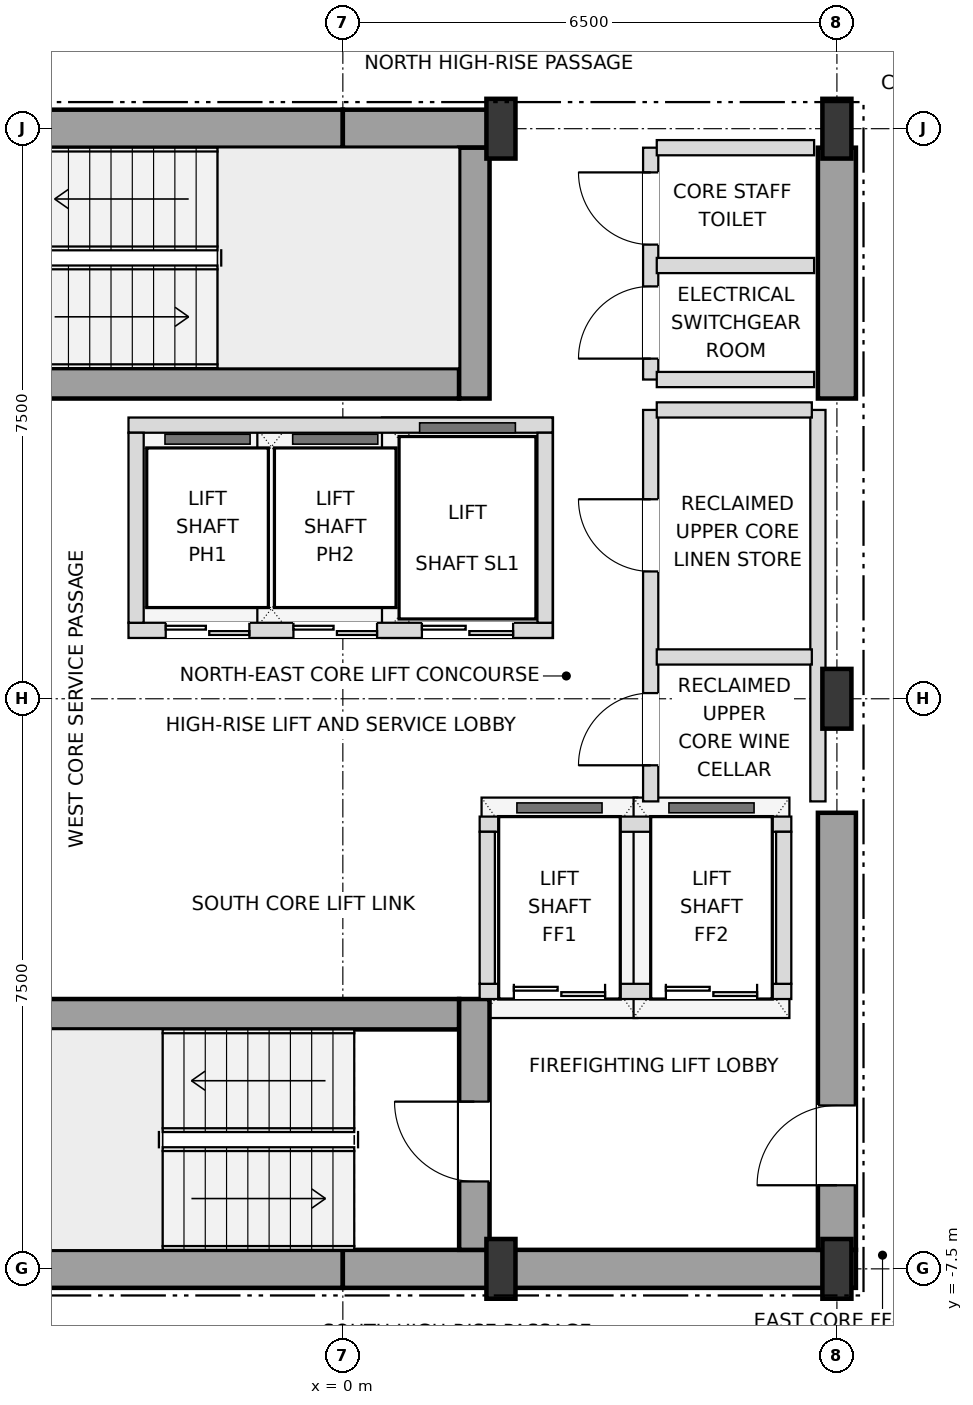
"""IFC4 building model, lengths in metres.
Left out: names, types, materials, properties, quantities, classifications, styles, units other than length and angle.
Written with IfcOpenShell. Run it as: python <this file> out.ifc"""

import sys

from ifc_helpers import new_model, si_unit, direction, frame, frame_2d, origin, origin_2d, place, context, subcontext, project, spatial, rectangle, i_section, extrude, element, fill, save


model = new_model("IFC4")
c1 = context("Model", 3, precision=1e-05, world=origin(), true_north=direction((0.0, 1.0)))
c2 = subcontext(c1, "Body", "Model", "MODEL_VIEW")
j1 = project(units=[si_unit("LENGTHUNIT", "METRE"), si_unit("PLANEANGLEUNIT", "RADIAN")], contexts=[c1])
p1 = place(None, origin())
s1 = spatial("IfcSite", under=j1, at=p1, CompositionType="ELEMENT")
p2 = place(p1, origin())
s2 = spatial("IfcBuilding", under=s1, at=p2, CompositionType="ELEMENT")
p3 = place(p2, frame((0.0, 0.0, 283.5)))
s3 = spatial("IfcBuildingStorey", under=s2, at=p3, CompositionType="ELEMENT", Elevation=283.5)
for number, where, z_axis, x_axis in (
    (1, (2.08, -7.5, 0.0), (0.0, 0.0, 1.0), (1.0, 0.0, 0.0)),
    (2, (6.5, -7.5, 0.0), (0.0, 0.0, 1.0), (1.0, 0.0, 0.0)),
    (3, (6.5, 0.0, 0.0), (0.0, 0.0, 1.0), (1.0, 0.0, 0.0)),
    (4, (2.08, 7.5, 0.0), (0.0, 0.0, 1.0), (1.0, 0.0, 0.0)),
    (5, (6.5, 7.5, 0.0), (0.0, 0.0, 1.0), (1.0, 0.0, 0.0)),
):
    element("IfcColumn", number, at=place(p3, frame(where, z_axis=z_axis, x_axis=x_axis)), inside=s3, PredefinedType="COLUMN", context=c2, shape_type="SweptSolid", body=[
        extrude(i_section(OverallWidth=0.382, OverallDepth=0.786, WebThickness=0.02, FlangeThickness=0.033, at=origin_2d()), origin(), (0.0, 0.0, 1.0), 3.6),
    ])
for number, where, z_axis, x_axis in (
    (6, (-6.75, -7.5, 0.0), (0.0, 0.0, 1.0), (1.0, 0.0, 0.0)),
    (7, (0.0, -7.5, 0.0), (0.0, 0.0, 1.0), (1.0, 0.0, 0.0)),
):
    element("IfcWall", number, at=place(p3, frame(where, z_axis=z_axis, x_axis=x_axis)), inside=s3, PredefinedType="SHEAR", context=c2, shape_type="SweptSolid", body=[
        extrude(rectangle(XDim=6.75, YDim=0.5, at=frame_2d((3.375, 0.0))), origin(), (0.0, 0.0, 1.0), 3.38),
    ])
p4 = place(p3, frame((-6.75, 7.5, 0.0), z_axis=(0.0, 0.0, 1.0), x_axis=(1.0, 0.0, 0.0)))
e8 = element("IfcWall", 8, at=p4, inside=s3, PredefinedType="SHEAR", context=c2, shape_type="SweptSolid", body=[
    extrude(rectangle(XDim=6.75, YDim=0.5, at=frame_2d((3.375, 0.0))), origin(), (0.0, 0.0, 1.0), 3.38),
])
p5 = place(p4, frame((1.65, 0.0, 0.0)))
e9 = element("IfcOpeningElement", 9, at=p5, cuts=e8, PredefinedType="OPENING", context=c2, shape_type="SweptSolid", body=[
    extrude(rectangle(XDim=1.05, YDim=2.15, at=frame_2d((0.525, 1.075))), frame((0.0, 0.26, 0.0), z_axis=(0.0, -1.0, 0.0), x_axis=(1.0, 0.0, 0.0)), (0.0, 0.0, 1.0), 0.52),
])
p6 = place(p3, frame((0.0, 7.5, 0.0), z_axis=(0.0, 0.0, 1.0), x_axis=(1.0, 0.0, 0.0)))
e10 = element("IfcWall", 10, at=p6, inside=s3, PredefinedType="SHEAR", context=c2, shape_type="SweptSolid", body=[
    extrude(rectangle(XDim=2.08, YDim=0.5, at=frame_2d((1.04, 0.0))), origin(), (0.0, 0.0, 1.0), 3.38),
])
p7 = place(p3, frame((6.5, -7.25, 0.0), z_axis=(0.0, 0.0, 1.0), x_axis=(0.0, 1.0, 0.0)))
e11 = element("IfcWall", 11, at=p7, inside=s3, PredefinedType="SHEAR", context=c2, shape_type="SweptSolid", body=[
    extrude(rectangle(XDim=5.75, YDim=0.5, at=frame_2d((2.875, 0.0))), origin(), (0.0, 0.0, 1.0), 3.38),
])
p8 = place(p7, frame((0.85, 0.0, 0.0)))
e12 = element("IfcOpeningElement", 12, at=p8, cuts=e11, PredefinedType="OPENING", context=c2, shape_type="SweptSolid", body=[
    extrude(rectangle(XDim=1.05, YDim=2.15, at=frame_2d((0.525, 1.075))), frame((0.0, 0.26, 0.0), z_axis=(0.0, -1.0, 0.0), x_axis=(1.0, 0.0, 0.0)), (0.0, 0.0, 1.0), 0.52),
])
p9 = place(p3, frame((6.5, 3.95, 0.0), z_axis=(0.0, 0.0, 1.0), x_axis=(0.0, 1.0, 0.0)))
e13 = element("IfcWall", 13, at=p9, inside=s3, PredefinedType="SHEAR", context=c2, shape_type="SweptSolid", body=[
    extrude(rectangle(XDim=3.3, YDim=0.5, at=frame_2d((1.65, 0.0))), origin(), (0.0, 0.0, 1.0), 3.38),
])
p10 = place(p3, frame((-6.25, -4.15, 0.0), z_axis=(0.0, 0.0, 1.0), x_axis=(1.0, 0.0, 0.0)))
e14 = element("IfcWall", 14, at=p10, inside=s3, PredefinedType="SHEAR", context=c2, shape_type="SweptSolid", body=[
    extrude(rectangle(XDim=7.78, YDim=0.4, at=frame_2d((3.89, 0.0))), origin(), (0.0, 0.0, 1.0), 3.38),
])
p11 = place(p3, frame((1.73, -7.25, 0.0), z_axis=(0.0, 0.0, 1.0), x_axis=(0.0, 1.0, 0.0)))
e15 = element("IfcWall", 15, at=p11, inside=s3, PredefinedType="SHEAR", context=c2, shape_type="SweptSolid", body=[
    extrude(rectangle(XDim=3.3, YDim=0.4, at=frame_2d((1.65, 0.0))), origin(), (0.0, 0.0, 1.0), 3.38),
])
p12 = place(p11, frame((0.9, 0.0, 0.0)))
e16 = element("IfcOpeningElement", 16, at=p12, cuts=e15, PredefinedType="OPENING", context=c2, shape_type="SweptSolid", body=[
    extrude(rectangle(XDim=1.05, YDim=2.15, at=frame_2d((0.525, 1.075))), frame((0.0, 0.21, 0.0), z_axis=(0.0, -1.0, 0.0), x_axis=(1.0, 0.0, 0.0)), (0.0, 0.0, 1.0), 0.42),
])
p13 = place(p3, frame((-5.55, 4.15, 0.0), z_axis=(0.0, 0.0, 1.0), x_axis=(1.0, 0.0, 0.0)))
e17 = element("IfcWall", 17, at=p13, inside=s3, PredefinedType="SHEAR", context=c2, shape_type="SweptSolid", body=[
    extrude(rectangle(XDim=7.08, YDim=0.4, at=frame_2d((3.54, 0.0))), origin(), (0.0, 0.0, 1.0), 3.38),
])
p14 = place(p3, frame((1.73, 3.95, 0.0), z_axis=(0.0, 0.0, 1.0), x_axis=(0.0, 1.0, 0.0)))
e18 = element("IfcWall", 18, at=p14, inside=s3, PredefinedType="SHEAR", context=c2, shape_type="SweptSolid", body=[
    extrude(rectangle(XDim=3.3, YDim=0.4, at=frame_2d((1.65, 0.0))), origin(), (0.0, 0.0, 1.0), 3.38),
])
p15 = place(p3, frame((-2.82, 0.9, 0.0), z_axis=(0.0, 0.0, 1.0), x_axis=(1.0, 0.0, 0.0)))
e19 = element("IfcWall", 19, at=p15, inside=s3, PredefinedType="SOLIDWALL", context=c2, shape_type="SweptSolid", body=[
    extrude(rectangle(XDim=5.58, YDim=0.2, at=frame_2d((2.79, 0.0))), origin(), (0.0, 0.0, 1.0), 3.38),
])
p16 = place(p15, frame((0.49, 0.0, 0.0)))
e20 = element("IfcOpeningElement", 20, at=p16, cuts=e19, PredefinedType="OPENING", context=c2, shape_type="SweptSolid", body=[
    extrude(rectangle(XDim=1.1, YDim=2.15, at=frame_2d((0.55, 1.075))), frame((0.0, 0.11, 0.0), z_axis=(0.0, -1.0, 0.0), x_axis=(1.0, 0.0, 0.0)), (0.0, 0.0, 1.0), 0.22),
])
p17 = place(p15, frame((2.17, 0.0, 0.0)))
e21 = element("IfcOpeningElement", 21, at=p17, cuts=e19, PredefinedType="OPENING", context=c2, shape_type="SweptSolid", body=[
    extrude(rectangle(XDim=1.1, YDim=2.15, at=frame_2d((0.55, 1.075))), frame((0.0, 0.11, 0.0), z_axis=(0.0, -1.0, 0.0), x_axis=(1.0, 0.0, 0.0)), (0.0, 0.0, 1.0), 0.22),
])
p18 = place(p15, frame((3.86, 0.0, 0.0)))
e22 = element("IfcOpeningElement", 22, at=p18, cuts=e19, PredefinedType="OPENING", context=c2, shape_type="SweptSolid", body=[
    extrude(rectangle(XDim=1.2, YDim=2.2, at=frame_2d((0.6, 1.1))), frame((0.0, 0.11, 0.0), z_axis=(0.0, -1.0, 0.0), x_axis=(1.0, 0.0, 0.0)), (0.0, 0.0, 1.0), 0.22),
])
p19 = place(p3, frame((-2.82, 3.6, 0.0), z_axis=(0.0, 0.0, 1.0), x_axis=(1.0, 0.0, 0.0)))
e23 = element("IfcWall", 23, at=p19, inside=s3, PredefinedType="SOLIDWALL", context=c2, shape_type="SweptSolid", body=[
    extrude(rectangle(XDim=5.58, YDim=0.2, at=frame_2d((2.79, 0.0))), origin(), (0.0, 0.0, 1.0), 3.38),
])
for number, where, z_axis, x_axis in (
    (24, (-2.72, 1.0, 0.0), (0.0, 0.0, 1.0), (0.0, 1.0, 0.0)),
    (25, (2.66, 1.0, 0.0), (0.0, 0.0, 1.0), (0.0, 1.0, 0.0)),
):
    element("IfcWall", number, at=place(p3, frame(where, z_axis=z_axis, x_axis=x_axis)), inside=s3, PredefinedType="SOLIDWALL", context=c2, shape_type="SweptSolid", body=[
        extrude(rectangle(XDim=2.5, YDim=0.2, at=frame_2d((1.25, 0.0))), origin(), (0.0, 0.0, 1.0), 3.38),
    ])
p20 = place(p3, frame((1.8, -3.85, 0.0), z_axis=(0.0, 0.0, 1.0), x_axis=(1.0, 0.0, 0.0)))
e26 = element("IfcWall", 26, at=p20, inside=s3, PredefinedType="SOLIDWALL", context=c2, shape_type="SweptSolid", body=[
    extrude(rectangle(XDim=4.1, YDim=0.2, at=frame_2d((2.05, 0.0))), origin(), (0.0, 0.0, 1.0), 3.38),
])
p21 = place(p20, frame((0.45, 0.0, 0.0)))
e27 = element("IfcOpeningElement", 27, at=p21, cuts=e26, PredefinedType="OPENING", context=c2, shape_type="SweptSolid", body=[
    extrude(rectangle(XDim=1.2, YDim=2.2, at=frame_2d((0.6, 1.1))), frame((0.0, 0.11, 0.0), z_axis=(0.0, -1.0, 0.0), x_axis=(1.0, 0.0, 0.0)), (0.0, 0.0, 1.0), 0.22),
])
p22 = place(p20, frame((2.45, 0.0, 0.0)))
e28 = element("IfcOpeningElement", 28, at=p22, cuts=e26, PredefinedType="OPENING", context=c2, shape_type="SweptSolid", body=[
    extrude(rectangle(XDim=1.2, YDim=2.2, at=frame_2d((0.6, 1.1))), frame((0.0, 0.11, 0.0), z_axis=(0.0, -1.0, 0.0), x_axis=(1.0, 0.0, 0.0)), (0.0, 0.0, 1.0), 0.22),
])
p23 = place(p3, frame((1.8, -1.65, 0.0), z_axis=(0.0, 0.0, 1.0), x_axis=(1.0, 0.0, 0.0)))
e29 = element("IfcWall", 29, at=p23, inside=s3, PredefinedType="SOLIDWALL", context=c2, shape_type="SweptSolid", body=[
    extrude(rectangle(XDim=4.1, YDim=0.2, at=frame_2d((2.05, 0.0))), origin(), (0.0, 0.0, 1.0), 3.38),
])
for number, where, z_axis, x_axis in (
    (30, (1.9, -3.75, 0.0), (0.0, 0.0, 1.0), (0.0, 1.0, 0.0)),
    (31, (5.8, -3.75, 0.0), (0.0, 0.0, 1.0), (0.0, 1.0, 0.0)),
):
    element("IfcWall", number, at=place(p3, frame(where, z_axis=z_axis, x_axis=x_axis)), inside=s3, PredefinedType="SOLIDWALL", context=c2, shape_type="SweptSolid", body=[
        extrude(rectangle(XDim=2.0, YDim=0.2, at=frame_2d((1.0, 0.0))), origin(), (0.0, 0.0, 1.0), 3.38),
    ])
p24 = place(p3, frame((4.05, -1.35, 0.0), z_axis=(0.0, 0.0, 1.0), x_axis=(0.0, 1.0, 0.0)))
e32 = element("IfcWall", 32, at=p24, inside=s3, PredefinedType="SOLIDWALL", context=c2, shape_type="SweptSolid", body=[
    extrude(rectangle(XDim=5.15, YDim=0.2, at=frame_2d((2.575, 0.0))), origin(), (0.0, 0.0, 1.0), 3.38),
])
p25 = place(p24, frame((0.475, 0.0, 0.0)))
e33 = element("IfcOpeningElement", 33, at=p25, cuts=e32, PredefinedType="OPENING", context=c2, shape_type="SweptSolid", body=[
    extrude(rectangle(XDim=0.95, YDim=2.15, at=frame_2d((0.475, 1.075))), frame((0.0, 0.11, 0.0), z_axis=(0.0, -1.0, 0.0), x_axis=(1.0, 0.0, 0.0)), (0.0, 0.0, 1.0), 0.22),
])
p26 = place(p24, frame((3.025, 0.0, 0.0)))
e34 = element("IfcOpeningElement", 34, at=p26, cuts=e32, PredefinedType="OPENING", context=c2, shape_type="SweptSolid", body=[
    extrude(rectangle(XDim=0.95, YDim=2.15, at=frame_2d((0.475, 1.075))), frame((0.0, 0.11, 0.0), z_axis=(0.0, -1.0, 0.0), x_axis=(1.0, 0.0, 0.0)), (0.0, 0.0, 1.0), 0.22),
])
p27 = place(p3, frame((4.05, 4.2, 0.0), z_axis=(0.0, 0.0, 1.0), x_axis=(0.0, 1.0, 0.0)))
e35 = element("IfcWall", 35, at=p27, inside=s3, PredefinedType="SOLIDWALL", context=c2, shape_type="SweptSolid", body=[
    extrude(rectangle(XDim=3.05, YDim=0.2, at=frame_2d((1.525, 0.0))), origin(), (0.0, 0.0, 1.0), 3.38),
])
p28 = place(p27, frame((0.275, 0.0, 0.0)))
e36 = element("IfcOpeningElement", 36, at=p28, cuts=e35, PredefinedType="OPENING", context=c2, shape_type="SweptSolid", body=[
    extrude(rectangle(XDim=0.95, YDim=2.15, at=frame_2d((0.475, 1.075))), frame((0.0, 0.11, 0.0), z_axis=(0.0, -1.0, 0.0), x_axis=(1.0, 0.0, 0.0)), (0.0, 0.0, 1.0), 0.22),
])
p29 = place(p27, frame((1.775, 0.0, 0.0)))
e37 = element("IfcOpeningElement", 37, at=p29, cuts=e35, PredefinedType="OPENING", context=c2, shape_type="SweptSolid", body=[
    extrude(rectangle(XDim=0.95, YDim=2.15, at=frame_2d((0.475, 1.075))), frame((0.0, 0.11, 0.0), z_axis=(0.0, -1.0, 0.0), x_axis=(1.0, 0.0, 0.0)), (0.0, 0.0, 1.0), 0.22),
])
p30 = place(p3, frame((6.25, -1.35, 0.0), z_axis=(0.0, 0.0, 1.0), x_axis=(0.0, 1.0, 0.0)))
e38 = element("IfcWall", 38, at=p30, inside=s3, PredefinedType="SOLIDWALL", context=c2, shape_type="SweptSolid", body=[
    extrude(rectangle(XDim=5.15, YDim=0.2, at=frame_2d((2.575, 0.0))), origin(), (0.0, 0.0, 1.0), 3.38),
])
for number, where, z_axis, x_axis in (
    (39, (4.13, 0.55, 0.0), (0.0, 0.0, 1.0), (1.0, 0.0, 0.0)),
    (40, (4.13, 3.8, 0.0), (0.0, 0.0, 1.0), (1.0, 0.0, 0.0)),
):
    element("IfcWall", number, at=place(p3, frame(where, z_axis=z_axis, x_axis=x_axis)), inside=s3, PredefinedType="SOLIDWALL", context=c2, shape_type="SweptSolid", body=[
        extrude(rectangle(XDim=2.04, YDim=0.2, at=frame_2d((1.02, 0.0))), origin(), (0.0, 0.0, 1.0), 3.38),
    ])
for number, where, z_axis, x_axis in (
    (41, (4.13, 4.2, 0.0), (0.0, 0.0, 1.0), (1.0, 0.0, 0.0)),
    (42, (4.13, 5.7, 0.0), (0.0, 0.0, 1.0), (1.0, 0.0, 0.0)),
    (43, (4.13, 7.25, 0.0), (0.0, 0.0, 1.0), (1.0, 0.0, 0.0)),
):
    element("IfcWall", number, at=place(p3, frame(where, z_axis=z_axis, x_axis=x_axis)), inside=s3, PredefinedType="SOLIDWALL", context=c2, shape_type="SweptSolid", body=[
        extrude(rectangle(XDim=2.07, YDim=0.2, at=frame_2d((1.035, 0.0))), origin(), (0.0, 0.0, 1.0), 3.38),
    ])
p31 = place(p8, origin())
e44 = element("IfcDoor", 44, at=p31, inside=s3, OperationType="SINGLE_SWING_LEFT", PredefinedType="DOOR", context=c2, shape_type="SweptSolid", body=[
    extrude(rectangle(XDim=1.05, YDim=2.15, at=frame_2d((0.525, 1.075))), frame((0.0, 0.025, 0.0), z_axis=(0.0, -1.0, 0.0), x_axis=(1.0, 0.0, 0.0)), (0.0, 0.0, 1.0), 0.05),
])
fill(e12, e44)
p32 = place(p12, origin())
e45 = element("IfcDoor", 45, at=p32, inside=s3, OperationType="SINGLE_SWING_RIGHT", PredefinedType="DOOR", context=c2, shape_type="SweptSolid", body=[
    extrude(rectangle(XDim=1.05, YDim=2.15, at=frame_2d((0.525, 1.075))), frame((0.0, 0.025, 0.0), z_axis=(0.0, -1.0, 0.0), x_axis=(1.0, 0.0, 0.0)), (0.0, 0.0, 1.0), 0.05),
])
fill(e16, e45)
p33 = place(p16, origin())
e46 = element("IfcDoor", 46, at=p33, inside=s3, OperationType="DOUBLE_DOOR_SLIDING", PredefinedType="DOOR", context=c2, shape_type="SweptSolid", body=[
    extrude(rectangle(XDim=1.1, YDim=2.15, at=frame_2d((0.55, 1.075))), frame((0.0, 0.025, 0.0), z_axis=(0.0, -1.0, 0.0), x_axis=(1.0, 0.0, 0.0)), (0.0, 0.0, 1.0), 0.05),
])
fill(e20, e46)
p34 = place(p17, origin())
e47 = element("IfcDoor", 47, at=p34, inside=s3, OperationType="DOUBLE_DOOR_SLIDING", PredefinedType="DOOR", context=c2, shape_type="SweptSolid", body=[
    extrude(rectangle(XDim=1.1, YDim=2.15, at=frame_2d((0.55, 1.075))), frame((0.0, 0.025, 0.0), z_axis=(0.0, -1.0, 0.0), x_axis=(1.0, 0.0, 0.0)), (0.0, 0.0, 1.0), 0.05),
])
fill(e21, e47)
p35 = place(p18, origin())
e48 = element("IfcDoor", 48, at=p35, inside=s3, OperationType="DOUBLE_DOOR_SLIDING", PredefinedType="DOOR", context=c2, shape_type="SweptSolid", body=[
    extrude(rectangle(XDim=1.2, YDim=2.2, at=frame_2d((0.6, 1.1))), frame((0.0, 0.025, 0.0), z_axis=(0.0, -1.0, 0.0), x_axis=(1.0, 0.0, 0.0)), (0.0, 0.0, 1.0), 0.05),
])
fill(e22, e48)
p36 = place(p21, origin())
e49 = element("IfcDoor", 49, at=p36, inside=s3, OperationType="DOUBLE_DOOR_SLIDING", PredefinedType="DOOR", context=c2, shape_type="SweptSolid", body=[
    extrude(rectangle(XDim=1.2, YDim=2.2, at=frame_2d((0.6, 1.1))), frame((0.0, 0.025, 0.0), z_axis=(0.0, -1.0, 0.0), x_axis=(1.0, 0.0, 0.0)), (0.0, 0.0, 1.0), 0.05),
])
fill(e27, e49)
p37 = place(p22, origin())
e50 = element("IfcDoor", 50, at=p37, inside=s3, OperationType="DOUBLE_DOOR_SLIDING", PredefinedType="DOOR", context=c2, shape_type="SweptSolid", body=[
    extrude(rectangle(XDim=1.2, YDim=2.2, at=frame_2d((0.6, 1.1))), frame((0.0, 0.025, 0.0), z_axis=(0.0, -1.0, 0.0), x_axis=(1.0, 0.0, 0.0)), (0.0, 0.0, 1.0), 0.05),
])
fill(e28, e50)
p38 = place(p25, origin())
e51 = element("IfcDoor", 51, at=p38, inside=s3, OperationType="SINGLE_SWING_LEFT", PredefinedType="DOOR", context=c2, shape_type="SweptSolid", body=[
    extrude(rectangle(XDim=0.95, YDim=2.15, at=frame_2d((0.475, 1.075))), frame((0.0, 0.025, 0.0), z_axis=(0.0, -1.0, 0.0), x_axis=(1.0, 0.0, 0.0)), (0.0, 0.0, 1.0), 0.05),
])
fill(e33, e51)
p39 = place(p26, origin())
e52 = element("IfcDoor", 52, at=p39, inside=s3, OperationType="SINGLE_SWING_RIGHT", PredefinedType="DOOR", context=c2, shape_type="SweptSolid", body=[
    extrude(rectangle(XDim=0.95, YDim=2.15, at=frame_2d((0.475, 1.075))), frame((0.0, 0.025, 0.0), z_axis=(0.0, -1.0, 0.0), x_axis=(1.0, 0.0, 0.0)), (0.0, 0.0, 1.0), 0.05),
])
fill(e34, e52)
p40 = place(p28, origin())
e53 = element("IfcDoor", 53, at=p40, inside=s3, OperationType="SINGLE_SWING_LEFT", PredefinedType="DOOR", context=c2, shape_type="SweptSolid", body=[
    extrude(rectangle(XDim=0.95, YDim=2.15, at=frame_2d((0.475, 1.075))), frame((0.0, 0.025, 0.0), z_axis=(0.0, -1.0, 0.0), x_axis=(1.0, 0.0, 0.0)), (0.0, 0.0, 1.0), 0.05),
])
fill(e36, e53)
p41 = place(p29, origin())
e54 = element("IfcDoor", 54, at=p41, inside=s3, OperationType="SINGLE_SWING_RIGHT", PredefinedType="DOOR", context=c2, shape_type="SweptSolid", body=[
    extrude(rectangle(XDim=0.95, YDim=2.15, at=frame_2d((0.475, 1.075))), frame((0.0, 0.025, 0.0), z_axis=(0.0, -1.0, 0.0), x_axis=(1.0, 0.0, 0.0)), (0.0, 0.0, 1.0), 0.05),
])
fill(e37, e54)
save(model, sys.argv[1])
